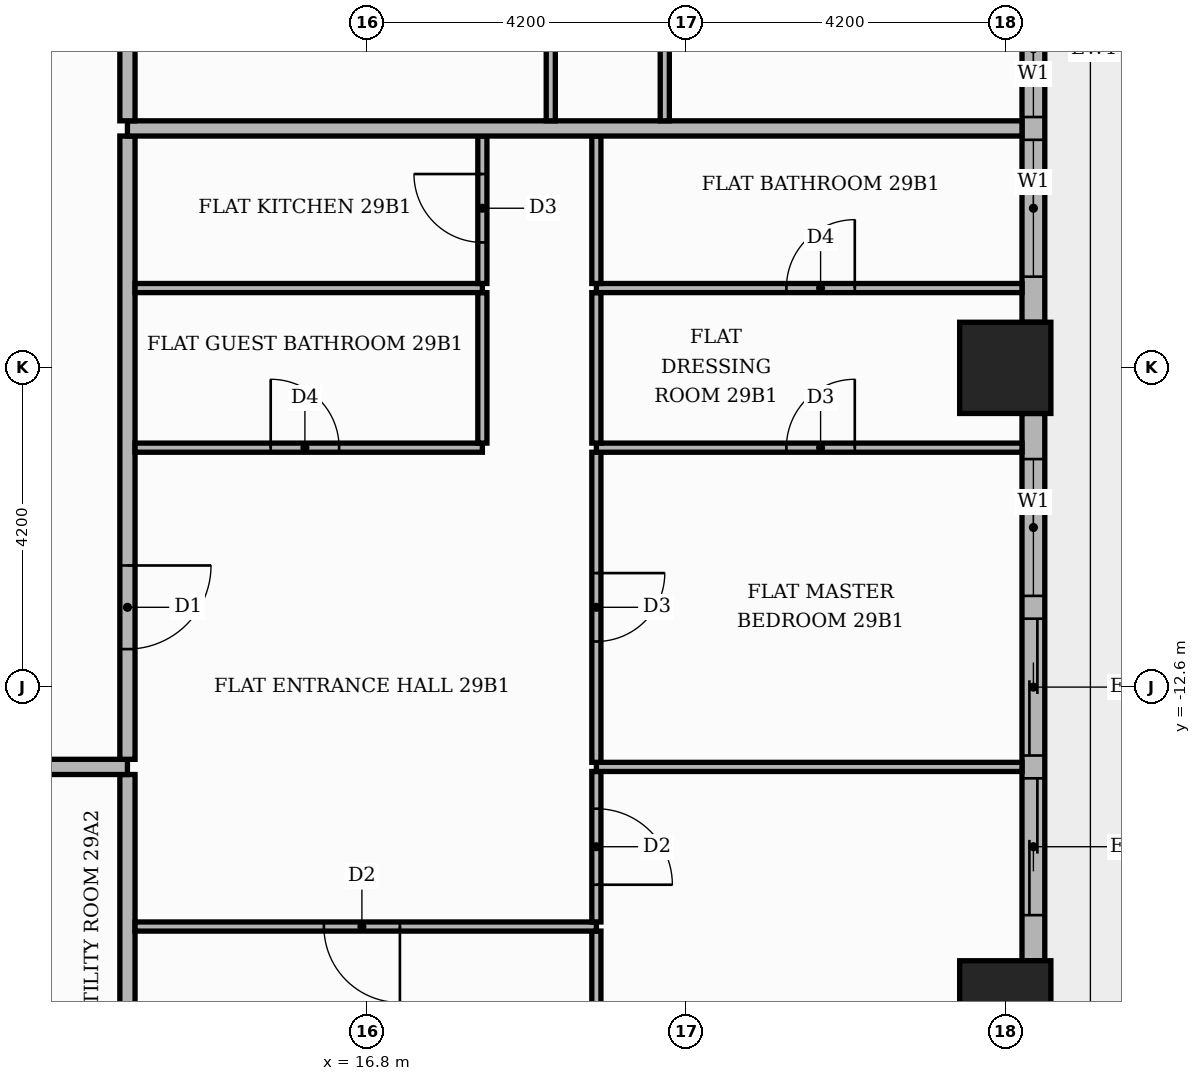
"""IFC4 building model, lengths in metres.
Left out: names, types, materials, properties, quantities, classifications, styles, units other than length and angle.
Written with IfcOpenShell. Run it as: python <this file> out.ifc"""

import sys

from ifc_helpers import new_model, si_unit, direction, frame, frame_2d, origin, origin_2d, place, context, subcontext, project, spatial, rectangle, extrude, element, fill, save


model = new_model("IFC4")
c1 = context("Model", 3, precision=1e-05, world=origin(), true_north=direction((0.0, 1.0)))
c2 = subcontext(c1, "Body", "Model", "MODEL_VIEW")
j1 = project(units=[si_unit("LENGTHUNIT", "METRE"), si_unit("PLANEANGLEUNIT", "RADIAN")], contexts=[c1])
p1 = place(None, origin())
s1 = spatial("IfcSite", under=j1, at=p1, CompositionType="ELEMENT")
p2 = place(p1, origin())
s2 = spatial("IfcBuilding", under=s1, at=p2, CompositionType="ELEMENT")
p3 = place(p2, frame((0.0, 0.0, 122.1)))
s3 = spatial("IfcBuildingStorey", under=s2, at=p3, CompositionType="ELEMENT", Elevation=122.1)
for number, where, z_axis, x_axis in (
    (1, (25.2, -8.4, 0.0), (0.0, 0.0, 1.0), (1.0, 0.0, 0.0)),
    (2, (25.2, -16.8, 0.0), (0.0, 0.0, 1.0), (1.0, 0.0, 0.0)),
):
    element("IfcColumn", number, at=place(p3, frame(where, z_axis=z_axis, x_axis=x_axis)), inside=s3, PredefinedType="COLUMN", context=c2, shape_type="SweptSolid", body=[
        extrude(rectangle(XDim=1.2, YDim=1.2, at=origin_2d()), origin(), (0.0, 0.0, 1.0), 3.9),
    ])
p4 = place(p3, frame((25.57, -16.2, 0.0), z_axis=(0.0, 0.0, 1.0), x_axis=(0.0, 1.0, 0.0)))
e3 = element("IfcWall", 3, at=p4, inside=s3, PredefinedType="STANDARD", context=c2, shape_type="SweptSolid", body=[
    extrude(rectangle(XDim=7.2, YDim=0.3, at=frame_2d((3.6, 0.0))), origin(), (0.0, 0.0, 1.0), 3.4),
])
p5 = place(p4, frame((0.6, 0.0, 0.0)))
e4 = element("IfcOpeningElement", 4, at=p5, cuts=e3, PredefinedType="OPENING", context=c2, shape_type="SweptSolid", body=[
    extrude(rectangle(XDim=1.8, YDim=2.4, at=frame_2d((0.9, 1.2))), frame((0.0, 0.16, 0.0), z_axis=(0.0, -1.0, 0.0), x_axis=(1.0, 0.0, 0.0)), (0.0, 0.0, 1.0), 0.32),
])
p6 = place(p4, frame((2.7, 0.0, 0.0)))
e5 = element("IfcOpeningElement", 5, at=p6, cuts=e3, PredefinedType="OPENING", context=c2, shape_type="SweptSolid", body=[
    extrude(rectangle(XDim=1.8, YDim=2.4, at=frame_2d((0.9, 1.2))), frame((0.0, 0.16, 0.0), z_axis=(0.0, -1.0, 0.0), x_axis=(1.0, 0.0, 0.0)), (0.0, 0.0, 1.0), 0.32),
])
p7 = place(p4, frame((4.8, 0.0, 0.9)))
e6 = element("IfcOpeningElement", 6, at=p7, cuts=e3, PredefinedType="OPENING", context=c2, shape_type="SweptSolid", body=[
    extrude(rectangle(XDim=1.8, YDim=2.1, at=frame_2d((0.9, 1.05))), frame((0.0, 0.16, 0.0), z_axis=(0.0, -1.0, 0.0), x_axis=(1.0, 0.0, 0.0)), (0.0, 0.0, 1.0), 0.32),
])
p8 = place(p3, frame((25.57, -7.8, 0.0), z_axis=(0.0, 0.0, 1.0), x_axis=(0.0, 1.0, 0.0)))
e7 = element("IfcWall", 7, at=p8, inside=s3, PredefinedType="STANDARD", context=c2, shape_type="SweptSolid", body=[
    extrude(rectangle(XDim=7.2, YDim=0.3, at=frame_2d((3.6, 0.0))), origin(), (0.0, 0.0, 1.0), 3.4),
])
p9 = place(p8, frame((0.6, 0.0, 0.9)))
e8 = element("IfcOpeningElement", 8, at=p9, cuts=e7, PredefinedType="OPENING", context=c2, shape_type="SweptSolid", body=[
    extrude(rectangle(XDim=1.8, YDim=2.1, at=frame_2d((0.9, 1.05))), frame((0.0, 0.16, 0.0), z_axis=(0.0, -1.0, 0.0), x_axis=(1.0, 0.0, 0.0)), (0.0, 0.0, 1.0), 0.32),
])
p10 = place(p8, frame((2.7, 0.0, 0.9)))
e9 = element("IfcOpeningElement", 9, at=p10, cuts=e7, PredefinedType="OPENING", context=c2, shape_type="SweptSolid", body=[
    extrude(rectangle(XDim=1.8, YDim=2.1, at=frame_2d((0.9, 1.05))), frame((0.0, 0.16, 0.0), z_axis=(0.0, -1.0, 0.0), x_axis=(1.0, 0.0, 0.0)), (0.0, 0.0, 1.0), 0.32),
])
p11 = place(p8, frame((4.8, 0.0, 0.0)))
e10 = element("IfcOpeningElement", 10, at=p11, cuts=e7, PredefinedType="OPENING", context=c2, shape_type="SweptSolid", body=[
    extrude(rectangle(XDim=1.8, YDim=2.4, at=frame_2d((0.9, 1.2))), frame((0.0, 0.16, 0.0), z_axis=(0.0, -1.0, 0.0), x_axis=(1.0, 0.0, 0.0)), (0.0, 0.0, 1.0), 0.32),
])
p12 = place(p3, frame((13.65, -25.42, 0.0), z_axis=(0.0, 0.0, 1.0), x_axis=(0.0, 1.0, 0.0)))
e11 = element("IfcWall", 11, at=p12, inside=s3, PredefinedType="PARTITIONING", context=c2, shape_type="SweptSolid", body=[
    extrude(rectangle(XDim=11.67, YDim=0.2, at=frame_2d((5.835, 0.0))), origin(), (0.0, 0.0, 1.0), 3.4),
])
p13 = place(p3, frame((19.82, -17.4, 0.0), z_axis=(0.0, 0.0, 1.0), x_axis=(0.0, 1.0, 0.0)))
e12 = element("IfcWall", 12, at=p13, inside=s3, PredefinedType="PARTITIONING", context=c2, shape_type="SweptSolid", body=[
    extrude(rectangle(XDim=1.59, YDim=0.12, at=frame_2d((0.795, 0.0))), origin(), (0.0, 0.0, 1.0), 3.4),
])
p14 = place(p3, frame((13.75, -15.75, 0.0), z_axis=(0.0, 0.0, 1.0), x_axis=(1.0, 0.0, 0.0)))
e13 = element("IfcWall", 13, at=p14, inside=s3, PredefinedType="PARTITIONING", context=c2, shape_type="SweptSolid", body=[
    extrude(rectangle(XDim=6.07, YDim=0.12, at=frame_2d((3.035, 0.0))), origin(), (0.0, 0.0, 1.0), 3.4),
])
p15 = place(p14, frame((2.485, 0.0, 0.0)))
e14 = element("IfcOpeningElement", 14, at=p15, cuts=e13, PredefinedType="OPENING", context=c2, shape_type="SweptSolid", body=[
    extrude(rectangle(XDim=1.0, YDim=2.1, at=frame_2d((0.5, 1.05))), frame((0.0, 0.07, 0.0), z_axis=(0.0, -1.0, 0.0), x_axis=(1.0, 0.0, 0.0)), (0.0, 0.0, 1.0), 0.14),
])
p16 = place(p3, frame((19.82, -15.69, 0.0), z_axis=(0.0, 0.0, 1.0), x_axis=(0.0, 1.0, 0.0)))
e15 = element("IfcWall", 15, at=p16, inside=s3, PredefinedType="PARTITIONING", context=c2, shape_type="SweptSolid", body=[
    extrude(rectangle(XDim=1.98, YDim=0.12, at=frame_2d((0.99, 0.0))), origin(), (0.0, 0.0, 1.0), 3.4),
])
p17 = place(p16, frame((0.49, 0.0, 0.0)))
e16 = element("IfcOpeningElement", 16, at=p17, cuts=e15, PredefinedType="OPENING", context=c2, shape_type="SweptSolid", body=[
    extrude(rectangle(XDim=1.0, YDim=2.1, at=frame_2d((0.5, 1.05))), frame((0.0, 0.07, 0.0), z_axis=(0.0, -1.0, 0.0), x_axis=(1.0, 0.0, 0.0)), (0.0, 0.0, 1.0), 0.14),
])
p18 = place(p3, frame((-20.42, -13.65, 0.0), z_axis=(0.0, 0.0, 1.0), x_axis=(1.0, 0.0, 0.0)))
e17 = element("IfcWall", 17, at=p18, inside=s3, PredefinedType="PARTITIONING", context=c2, shape_type="SweptSolid", body=[
    extrude(rectangle(XDim=34.07, YDim=0.2, at=frame_2d((17.035, 0.0))), origin(), (0.0, 0.0, 1.0), 3.4),
])
p19 = place(p18, frame((8.32, 0.0, 0.0)))
e18 = element("IfcOpeningElement", 18, at=p19, cuts=e17, PredefinedType="OPENING", context=c2, shape_type="SweptSolid", body=[
    extrude(rectangle(XDim=1.1, YDim=2.4, at=frame_2d((0.55, 1.2))), frame((0.0, 0.11, 0.0), z_axis=(0.0, -1.0, 0.0), x_axis=(1.0, 0.0, 0.0)), (0.0, 0.0, 1.0), 0.22),
])
p20 = place(p18, frame((16.72, 0.0, 0.0)))
e19 = element("IfcOpeningElement", 19, at=p20, cuts=e17, PredefinedType="OPENING", context=c2, shape_type="SweptSolid", body=[
    extrude(rectangle(XDim=1.1, YDim=2.4, at=frame_2d((0.55, 1.2))), frame((0.0, 0.11, 0.0), z_axis=(0.0, -1.0, 0.0), x_axis=(1.0, 0.0, 0.0)), (0.0, 0.0, 1.0), 0.22),
])
p21 = place(p3, frame((19.82, -13.65, 0.0), z_axis=(0.0, 0.0, 1.0), x_axis=(1.0, 0.0, 0.0)))
e20 = element("IfcWall", 20, at=p21, inside=s3, PredefinedType="PARTITIONING", context=c2, shape_type="SweptSolid", body=[
    extrude(rectangle(XDim=5.6, YDim=0.12, at=frame_2d((2.8, 0.0))), origin(), (0.0, 0.0, 1.0), 3.4),
])
p22 = place(p3, frame((19.82, -13.59, 0.0), z_axis=(0.0, 0.0, 1.0), x_axis=(0.0, 1.0, 0.0)))
e21 = element("IfcWall", 21, at=p22, inside=s3, PredefinedType="PARTITIONING", context=c2, shape_type="SweptSolid", body=[
    extrude(rectangle(XDim=4.08, YDim=0.12, at=frame_2d((2.04, 0.0))), origin(), (0.0, 0.0, 1.0), 3.4),
])
p23 = place(p22, frame((1.59, 0.0, 0.0)))
e22 = element("IfcOpeningElement", 22, at=p23, cuts=e21, PredefinedType="OPENING", context=c2, shape_type="SweptSolid", body=[
    extrude(rectangle(XDim=0.9, YDim=2.1, at=frame_2d((0.45, 1.05))), frame((0.0, 0.07, 0.0), z_axis=(0.0, -1.0, 0.0), x_axis=(1.0, 0.0, 0.0)), (0.0, 0.0, 1.0), 0.14),
])
p24 = place(p3, frame((13.65, -13.55, 0.0), z_axis=(0.0, 0.0, 1.0), x_axis=(0.0, 1.0, 0.0)))
e23 = element("IfcWall", 23, at=p24, inside=s3, PredefinedType="PARTITIONING", context=c2, shape_type="SweptSolid", body=[
    extrude(rectangle(XDim=8.2, YDim=0.2, at=frame_2d((4.1, 0.0))), origin(), (0.0, 0.0, 1.0), 3.4),
])
p25 = place(p24, frame((1.45, 0.0, 0.0)))
e24 = element("IfcOpeningElement", 24, at=p25, cuts=e23, PredefinedType="OPENING", context=c2, shape_type="SweptSolid", body=[
    extrude(rectangle(XDim=1.1, YDim=2.4, at=frame_2d((0.55, 1.2))), frame((0.0, 0.11, 0.0), z_axis=(0.0, -1.0, 0.0), x_axis=(1.0, 0.0, 0.0)), (0.0, 0.0, 1.0), 0.22),
])
p26 = place(p3, frame((13.75, -9.45, 0.0), z_axis=(0.0, 0.0, 1.0), x_axis=(1.0, 0.0, 0.0)))
e25 = element("IfcWall", 25, at=p26, inside=s3, PredefinedType="PARTITIONING", context=c2, shape_type="SweptSolid", body=[
    extrude(rectangle(XDim=4.57, YDim=0.12, at=frame_2d((2.285, 0.0))), origin(), (0.0, 0.0, 1.0), 3.4),
])
p27 = place(p26, frame((1.785, 0.0, 0.0)))
e26 = element("IfcOpeningElement", 26, at=p27, cuts=e25, PredefinedType="OPENING", context=c2, shape_type="SweptSolid", body=[
    extrude(rectangle(XDim=0.9, YDim=2.1, at=frame_2d((0.45, 1.05))), frame((0.0, 0.07, 0.0), z_axis=(0.0, -1.0, 0.0), x_axis=(1.0, 0.0, 0.0)), (0.0, 0.0, 1.0), 0.14),
])
p28 = place(p3, frame((19.82, -9.45, 0.0), z_axis=(0.0, 0.0, 1.0), x_axis=(1.0, 0.0, 0.0)))
e27 = element("IfcWall", 27, at=p28, inside=s3, PredefinedType="PARTITIONING", context=c2, shape_type="SweptSolid", body=[
    extrude(rectangle(XDim=5.6, YDim=0.12, at=frame_2d((2.8, 0.0))), origin(), (0.0, 0.0, 1.0), 3.4),
])
p29 = place(p28, frame((2.5, 0.0, 0.0)))
e28 = element("IfcOpeningElement", 28, at=p29, cuts=e27, PredefinedType="OPENING", context=c2, shape_type="SweptSolid", body=[
    extrude(rectangle(XDim=0.9, YDim=2.1, at=frame_2d((0.45, 1.05))), frame((0.0, 0.07, 0.0), z_axis=(0.0, -1.0, 0.0), x_axis=(1.0, 0.0, 0.0)), (0.0, 0.0, 1.0), 0.14),
])
for number, where, z_axis, x_axis in (
    (29, (18.32, -9.39, 0.0), (0.0, 0.0, 1.0), (0.0, 1.0, 0.0)),
    (30, (19.82, -9.39, 0.0), (0.0, 0.0, 1.0), (0.0, 1.0, 0.0)),
):
    element("IfcWall", number, at=place(p3, frame(where, z_axis=z_axis, x_axis=x_axis)), inside=s3, PredefinedType="PARTITIONING", context=c2, shape_type="SweptSolid", body=[
        extrude(rectangle(XDim=1.98, YDim=0.12, at=frame_2d((0.99, 0.0))), origin(), (0.0, 0.0, 1.0), 3.4),
    ])
p30 = place(p3, frame((13.75, -7.35, 0.0), z_axis=(0.0, 0.0, 1.0), x_axis=(1.0, 0.0, 0.0)))
e31 = element("IfcWall", 31, at=p30, inside=s3, PredefinedType="PARTITIONING", context=c2, shape_type="SweptSolid", body=[
    extrude(rectangle(XDim=4.57, YDim=0.12, at=frame_2d((2.285, 0.0))), origin(), (0.0, 0.0, 1.0), 3.4),
])
p31 = place(p3, frame((19.82, -7.35, 0.0), z_axis=(0.0, 0.0, 1.0), x_axis=(1.0, 0.0, 0.0)))
e32 = element("IfcWall", 32, at=p31, inside=s3, PredefinedType="PARTITIONING", context=c2, shape_type="SweptSolid", body=[
    extrude(rectangle(XDim=5.6, YDim=0.12, at=frame_2d((2.8, 0.0))), origin(), (0.0, 0.0, 1.0), 3.4),
])
p32 = place(p31, frame((2.5, 0.0, 0.0)))
e33 = element("IfcOpeningElement", 33, at=p32, cuts=e32, PredefinedType="OPENING", context=c2, shape_type="SweptSolid", body=[
    extrude(rectangle(XDim=0.9, YDim=2.1, at=frame_2d((0.45, 1.05))), frame((0.0, 0.07, 0.0), z_axis=(0.0, -1.0, 0.0), x_axis=(1.0, 0.0, 0.0)), (0.0, 0.0, 1.0), 0.14),
])
p33 = place(p3, frame((18.32, -7.29, 0.0), z_axis=(0.0, 0.0, 1.0), x_axis=(0.0, 1.0, 0.0)))
e34 = element("IfcWall", 34, at=p33, inside=s3, PredefinedType="PARTITIONING", context=c2, shape_type="SweptSolid", body=[
    extrude(rectangle(XDim=1.94, YDim=0.12, at=frame_2d((0.97, 0.0))), origin(), (0.0, 0.0, 1.0), 3.4),
])
p34 = place(p33, frame((0.54, 0.0, 0.0)))
e35 = element("IfcOpeningElement", 35, at=p34, cuts=e34, PredefinedType="OPENING", context=c2, shape_type="SweptSolid", body=[
    extrude(rectangle(XDim=0.9, YDim=2.1, at=frame_2d((0.45, 1.05))), frame((0.0, 0.07, 0.0), z_axis=(0.0, -1.0, 0.0), x_axis=(1.0, 0.0, 0.0)), (0.0, 0.0, 1.0), 0.14),
])
p35 = place(p3, frame((19.82, -7.29, 0.0), z_axis=(0.0, 0.0, 1.0), x_axis=(0.0, 1.0, 0.0)))
e36 = element("IfcWall", 36, at=p35, inside=s3, PredefinedType="PARTITIONING", context=c2, shape_type="SweptSolid", body=[
    extrude(rectangle(XDim=1.94, YDim=0.12, at=frame_2d((0.97, 0.0))), origin(), (0.0, 0.0, 1.0), 3.4),
])
p36 = place(p3, frame((13.65, -5.25, 0.0), z_axis=(0.0, 0.0, 1.0), x_axis=(1.0, 0.0, 0.0)))
e37 = element("IfcWall", 37, at=p36, inside=s3, PredefinedType="PARTITIONING", context=c2, shape_type="SweptSolid", body=[
    extrude(rectangle(XDim=11.77, YDim=0.2, at=frame_2d((5.885, 0.0))), origin(), (0.0, 0.0, 1.0), 3.4),
])
p37 = place(p3, frame((13.65, -5.15, 0.0), z_axis=(0.0, 0.0, 1.0), x_axis=(0.0, 1.0, 0.0)))
e38 = element("IfcWall", 38, at=p37, inside=s3, PredefinedType="PARTITIONING", context=c2, shape_type="SweptSolid", body=[
    extrude(rectangle(XDim=18.7, YDim=0.2, at=frame_2d((9.35, 0.0))), origin(), (0.0, 0.0, 1.0), 3.4),
])
p38 = place(p37, frame((5.65, 0.0, 0.0)))
e39 = element("IfcOpeningElement", 39, at=p38, cuts=e38, PredefinedType="OPENING", context=c2, shape_type="SweptSolid", body=[
    extrude(rectangle(XDim=1.1, YDim=2.4, at=frame_2d((0.55, 1.2))), frame((0.0, 0.11, 0.0), z_axis=(0.0, -1.0, 0.0), x_axis=(1.0, 0.0, 0.0)), (0.0, 0.0, 1.0), 0.22),
])
p39 = place(p3, frame((19.22, -5.15, 0.0), z_axis=(0.0, 0.0, 1.0), x_axis=(0.0, 1.0, 0.0)))
e40 = element("IfcWall", 40, at=p39, inside=s3, PredefinedType="PARTITIONING", context=c2, shape_type="SweptSolid", body=[
    extrude(rectangle(XDim=4.04, YDim=0.12, at=frame_2d((2.02, 0.0))), origin(), (0.0, 0.0, 1.0), 3.4),
])
p40 = place(p3, frame((20.72, -5.15, 0.0), z_axis=(0.0, 0.0, 1.0), x_axis=(0.0, 1.0, 0.0)))
e41 = element("IfcWall", 41, at=p40, inside=s3, PredefinedType="PARTITIONING", context=c2, shape_type="SweptSolid", body=[
    extrude(rectangle(XDim=8.24, YDim=0.12, at=frame_2d((4.12, 0.0))), origin(), (0.0, 0.0, 1.0), 3.4),
])
p41 = place(p40, frame((3.65, 0.0, 0.0)))
e42 = element("IfcOpeningElement", 42, at=p41, cuts=e41, PredefinedType="OPENING", context=c2, shape_type="SweptSolid", body=[
    extrude(rectangle(XDim=0.9, YDim=2.1, at=frame_2d((0.45, 1.05))), frame((0.0, 0.07, 0.0), z_axis=(0.0, -1.0, 0.0), x_axis=(1.0, 0.0, 0.0)), (0.0, 0.0, 1.0), 0.14),
])
p42 = place(p5, origin())
e43 = element("IfcDoor", 43, at=p42, inside=s3, OperationType="SLIDING_TO_LEFT", PredefinedType="DOOR", context=c2, shape_type="SweptSolid", body=[
    extrude(rectangle(XDim=1.8, YDim=2.4, at=frame_2d((0.9, 1.2))), frame((0.0, 0.025, 0.0), z_axis=(0.0, -1.0, 0.0), x_axis=(1.0, 0.0, 0.0)), (0.0, 0.0, 1.0), 0.05),
])
fill(e4, e43)
p43 = place(p6, origin())
e44 = element("IfcDoor", 44, at=p43, inside=s3, OperationType="SLIDING_TO_RIGHT", PredefinedType="DOOR", context=c2, shape_type="SweptSolid", body=[
    extrude(rectangle(XDim=1.8, YDim=2.4, at=frame_2d((0.9, 1.2))), frame((0.0, 0.025, 0.0), z_axis=(0.0, -1.0, 0.0), x_axis=(1.0, 0.0, 0.0)), (0.0, 0.0, 1.0), 0.05),
])
fill(e5, e44)
p44 = place(p7, origin())
e45 = element("IfcWindow", 45, at=p44, inside=s3, PartitioningType="SINGLE_PANEL", PredefinedType="WINDOW", context=c2, shape_type="SweptSolid", body=[
    extrude(rectangle(XDim=1.8, YDim=2.1, at=frame_2d((0.9, 1.05))), frame((0.0, 0.03, 0.0), z_axis=(0.0, -1.0, 0.0), x_axis=(1.0, 0.0, 0.0)), (0.0, 0.0, 1.0), 0.06),
])
fill(e6, e45)
p45 = place(p9, origin())
e46 = element("IfcWindow", 46, at=p45, inside=s3, PartitioningType="SINGLE_PANEL", PredefinedType="WINDOW", context=c2, shape_type="SweptSolid", body=[
    extrude(rectangle(XDim=1.8, YDim=2.1, at=frame_2d((0.9, 1.05))), frame((0.0, 0.03, 0.0), z_axis=(0.0, -1.0, 0.0), x_axis=(1.0, 0.0, 0.0)), (0.0, 0.0, 1.0), 0.06),
])
fill(e8, e46)
p46 = place(p10, origin())
e47 = element("IfcWindow", 47, at=p46, inside=s3, PartitioningType="SINGLE_PANEL", PredefinedType="WINDOW", context=c2, shape_type="SweptSolid", body=[
    extrude(rectangle(XDim=1.8, YDim=2.1, at=frame_2d((0.9, 1.05))), frame((0.0, 0.03, 0.0), z_axis=(0.0, -1.0, 0.0), x_axis=(1.0, 0.0, 0.0)), (0.0, 0.0, 1.0), 0.06),
])
fill(e9, e47)
p47 = place(p25, frame((1.1, 0.0, 0.0), z_axis=(0.0, 0.0, 1.0), x_axis=(-1.0, 0.0, 0.0)))
e48 = element("IfcDoor", 48, at=p47, inside=s3, OperationType="SINGLE_SWING_RIGHT", PredefinedType="DOOR", context=c2, shape_type="SweptSolid", body=[
    extrude(rectangle(XDim=1.1, YDim=2.4, at=frame_2d((0.55, 1.2))), frame((0.0, 0.025, 0.0), z_axis=(0.0, -1.0, 0.0), x_axis=(1.0, 0.0, 0.0)), (0.0, 0.0, 1.0), 0.05),
])
fill(e24, e48)
p48 = place(p15, frame((1.0, 0.0, 0.0), z_axis=(0.0, 0.0, 1.0), x_axis=(-1.0, 0.0, 0.0)))
e49 = element("IfcDoor", 49, at=p48, inside=s3, OperationType="SINGLE_SWING_RIGHT", PredefinedType="DOOR", context=c2, shape_type="SweptSolid", body=[
    extrude(rectangle(XDim=1.0, YDim=2.1, at=frame_2d((0.5, 1.05))), frame((0.0, 0.025, 0.0), z_axis=(0.0, -1.0, 0.0), x_axis=(1.0, 0.0, 0.0)), (0.0, 0.0, 1.0), 0.05),
])
fill(e14, e49)
p49 = place(p27, origin())
e50 = element("IfcDoor", 50, at=p49, inside=s3, OperationType="SINGLE_SWING_LEFT", PredefinedType="DOOR", context=c2, shape_type="SweptSolid", body=[
    extrude(rectangle(XDim=0.9, YDim=2.1, at=frame_2d((0.45, 1.05))), frame((0.0, 0.025, 0.0), z_axis=(0.0, -1.0, 0.0), x_axis=(1.0, 0.0, 0.0)), (0.0, 0.0, 1.0), 0.05),
])
fill(e26, e50)
p50 = place(p34, origin())
e51 = element("IfcDoor", 51, at=p50, inside=s3, OperationType="SINGLE_SWING_RIGHT", PredefinedType="DOOR", context=c2, shape_type="SweptSolid", body=[
    extrude(rectangle(XDim=0.9, YDim=2.1, at=frame_2d((0.45, 1.05))), frame((0.0, 0.025, 0.0), z_axis=(0.0, -1.0, 0.0), x_axis=(1.0, 0.0, 0.0)), (0.0, 0.0, 1.0), 0.05),
])
fill(e35, e51)
p51 = place(p17, frame((1.0, 0.0, 0.0), z_axis=(0.0, 0.0, 1.0), x_axis=(-1.0, 0.0, 0.0)))
e52 = element("IfcDoor", 52, at=p51, inside=s3, OperationType="SINGLE_SWING_LEFT", PredefinedType="DOOR", context=c2, shape_type="SweptSolid", body=[
    extrude(rectangle(XDim=1.0, YDim=2.1, at=frame_2d((0.5, 1.05))), frame((0.0, 0.025, 0.0), z_axis=(0.0, -1.0, 0.0), x_axis=(1.0, 0.0, 0.0)), (0.0, 0.0, 1.0), 0.05),
])
fill(e16, e52)
p52 = place(p23, frame((0.9, 0.0, 0.0), z_axis=(0.0, 0.0, 1.0), x_axis=(-1.0, 0.0, 0.0)))
e53 = element("IfcDoor", 53, at=p52, inside=s3, OperationType="SINGLE_SWING_RIGHT", PredefinedType="DOOR", context=c2, shape_type="SweptSolid", body=[
    extrude(rectangle(XDim=0.9, YDim=2.1, at=frame_2d((0.45, 1.05))), frame((0.0, 0.025, 0.0), z_axis=(0.0, -1.0, 0.0), x_axis=(1.0, 0.0, 0.0)), (0.0, 0.0, 1.0), 0.05),
])
fill(e22, e53)
p53 = place(p29, origin())
e54 = element("IfcDoor", 54, at=p53, inside=s3, OperationType="SINGLE_SWING_RIGHT", PredefinedType="DOOR", context=c2, shape_type="SweptSolid", body=[
    extrude(rectangle(XDim=0.9, YDim=2.1, at=frame_2d((0.45, 1.05))), frame((0.0, 0.025, 0.0), z_axis=(0.0, -1.0, 0.0), x_axis=(1.0, 0.0, 0.0)), (0.0, 0.0, 1.0), 0.05),
])
fill(e28, e54)
p54 = place(p32, origin())
e55 = element("IfcDoor", 55, at=p54, inside=s3, OperationType="SINGLE_SWING_RIGHT", PredefinedType="DOOR", context=c2, shape_type="SweptSolid", body=[
    extrude(rectangle(XDim=0.9, YDim=2.1, at=frame_2d((0.45, 1.05))), frame((0.0, 0.025, 0.0), z_axis=(0.0, -1.0, 0.0), x_axis=(1.0, 0.0, 0.0)), (0.0, 0.0, 1.0), 0.05),
])
fill(e33, e55)
save(model, sys.argv[1])
